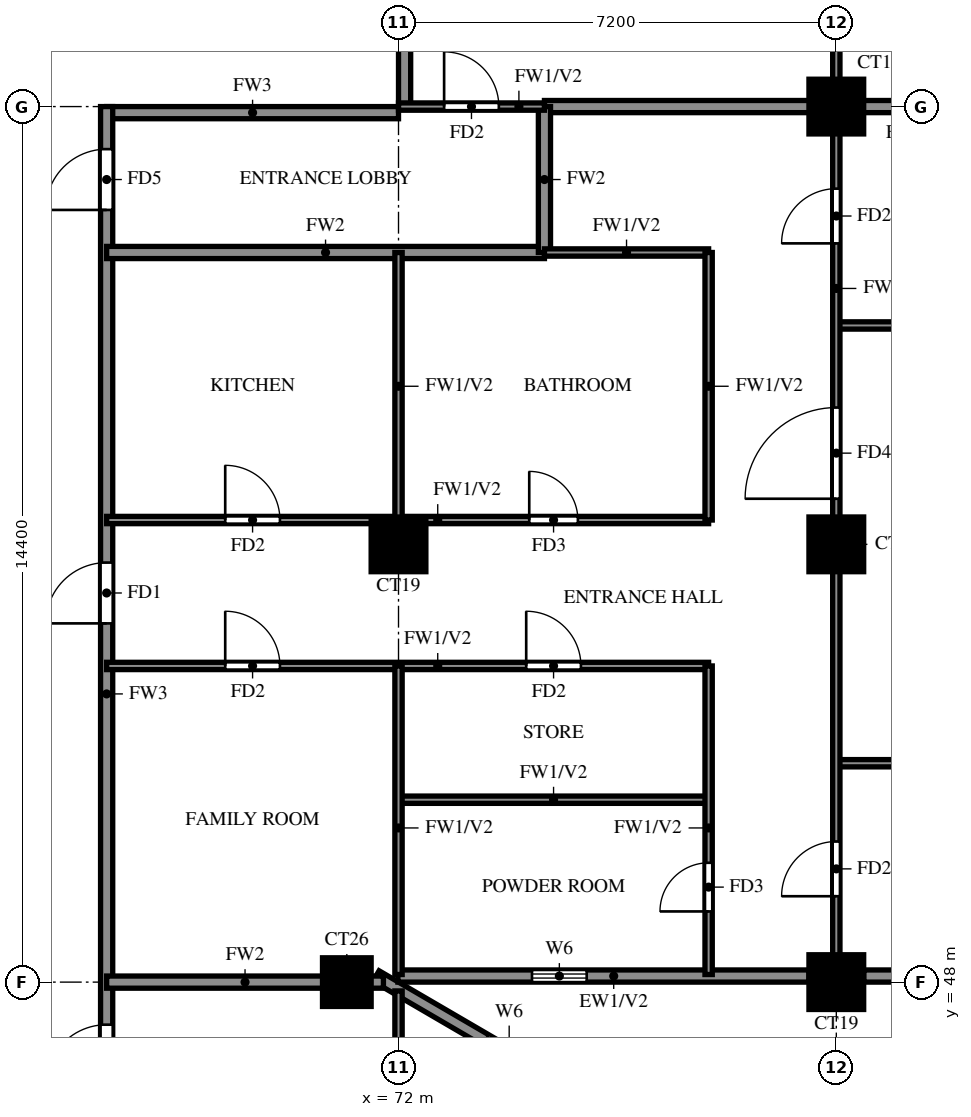
"""IFC4 building model, lengths in metres.
Left out: names, types, materials, properties, quantities, classifications, styles, units other than length and angle.
Written with IfcOpenShell. Run it as: python <this file> out.ifc"""

import sys

from ifc_helpers import new_model, si_unit, direction, frame, frame_2d, origin, origin_2d, place, context, subcontext, project, spatial, rectangle, extrude, source, transform, mapped, element, fill, save


model = new_model("IFC4")
c1 = context("Model", 3, precision=1e-05, world=origin(), true_north=direction((0.0, 1.0)))
c2 = subcontext(c1, "Body", "Model", "MODEL_VIEW")
j1 = project(units=[si_unit("LENGTHUNIT", "METRE"), si_unit("PLANEANGLEUNIT", "RADIAN")], contexts=[c1])
p1 = place(None, origin())
s1 = spatial("IfcSite", under=j1, at=p1, CompositionType="ELEMENT")
p2 = place(p1, origin())
s2 = spatial("IfcBuilding", under=s1, at=p2, CompositionType="ELEMENT")
p3 = place(p2, frame((0.0, 0.0, 185.0)))
s3 = spatial("IfcBuildingStorey", under=s2, at=p3, CompositionType="ELEMENT", Elevation=185.0)
m1 = source(origin(), c2, "Body", "SweptSolid", [
    extrude(rectangle(XDim=0.8, YDim=0.8, at=origin_2d()), origin(), (0.0, 0.0, 1.0), 3.2),
])
p4 = place(p3, frame((71.15, 48.0, 0.0), z_axis=(0.0, 0.0, 1.0), x_axis=(1.0, 0.0, 0.0)))
e1 = element("IfcColumn", 1, at=p4, inside=s3, PredefinedType="COLUMN", context=c2, shape_type="MappedRepresentation", body=[
    mapped(m1, transform((0.0, 0.0, 0.0))),
])
m2 = source(origin(), c2, "Body", "SweptSolid", [
    extrude(rectangle(XDim=0.9, YDim=0.9, at=origin_2d()), origin(), (0.0, 0.0, 1.0), 3.2),
])
for number, where, z_axis, x_axis in (
    (2, (79.2, 48.0, 0.0), (0.0, 0.0, 1.0), (1.0, 0.0, 0.0)),
    (3, (72.0, 55.2, 0.0), (0.0, 0.0, 1.0), (1.0, 0.0, 0.0)),
    (4, (79.2, 55.2, 0.0), (0.0, 0.0, 1.0), (1.0, 0.0, 0.0)),
    (5, (79.2, 62.4, 0.0), (0.0, 0.0, 1.0), (1.0, 0.0, 0.0)),
):
    element("IfcColumn", number, at=place(p3, frame(where, z_axis=z_axis, x_axis=x_axis)), inside=s3, PredefinedType="COLUMN", context=c2, shape_type="MappedRepresentation", body=[
        mapped(m2, transform((0.0, 0.0, 0.0))),
    ])
p5 = place(p3, frame((85.719, 39.881, 0.0), z_axis=(0.0, 0.0, 1.0), x_axis=(-0.86377618652, 0.503875678716, 0.0)))
e6 = element("IfcWall", 6, at=p5, inside=s3, PredefinedType="SOLIDWALL", context=c2, shape_type="SweptSolid", body=[
    extrude(rectangle(XDim=16.311, YDim=0.2, at=frame_2d((8.156, 0.0))), origin(), (0.0, 0.0, 1.0), 3.2),
])
p6 = place(p5, frame((13.326, 0.0, 1.5)))
e7 = element("IfcOpeningElement", 7, at=p6, cuts=e6, PredefinedType="OPENING", context=c2, shape_type="SweptSolid", body=[
    extrude(rectangle(XDim=0.9, YDim=0.9, at=frame_2d((0.45, 0.45))), frame((0.0, 0.11, 0.0), z_axis=(0.0, -1.0, 0.0), x_axis=(1.0, 0.0, 0.0)), (0.0, 0.0, 1.0), 0.22),
])
p7 = place(p3, frame((71.99, 48.1, 0.0), z_axis=(0.0, 0.0, 1.0), x_axis=(1.0, 0.0, 0.0)))
e8 = element("IfcWall", 8, at=p7, inside=s3, PredefinedType="SOLIDWALL", context=c2, shape_type="SweptSolid", body=[
    extrude(rectangle(XDim=6.76, YDim=0.2, at=frame_2d((3.38, 0.0))), origin(), (0.0, 0.0, 1.0), 3.2),
])
p8 = place(p7, frame((2.205, 0.0, 1.5)))
e9 = element("IfcOpeningElement", 9, at=p8, cuts=e8, PredefinedType="OPENING", context=c2, shape_type="SweptSolid", body=[
    extrude(rectangle(XDim=0.9, YDim=0.9, at=frame_2d((0.45, 0.45))), frame((0.0, 0.11, 0.0), z_axis=(0.0, -1.0, 0.0), x_axis=(1.0, 0.0, 0.0)), (0.0, 0.0, 1.0), 0.22),
])
p9 = place(p3, frame((79.65, 48.1, 0.0), z_axis=(0.0, 0.0, 1.0), x_axis=(1.0, 0.0, 0.0)))
e10 = element("IfcWall", 10, at=p9, inside=s3, PredefinedType="SOLIDWALL", context=c2, shape_type="SweptSolid", body=[
    extrude(rectangle(XDim=5.75, YDim=0.2, at=frame_2d((2.875, 0.0))), origin(), (0.0, 0.0, 1.0), 3.2),
])
p10 = place(p9, frame((1.675, 0.0, 0.6)))
e11 = element("IfcOpeningElement", 11, at=p10, cuts=e10, PredefinedType="OPENING", context=c2, shape_type="SweptSolid", body=[
    extrude(rectangle(XDim=2.4, YDim=2.4, at=frame_2d((1.2, 1.2))), frame((0.0, 0.11, 0.0), z_axis=(0.0, -1.0, 0.0), x_axis=(1.0, 0.0, 0.0)), (0.0, 0.0, 1.0), 0.22),
])
p11 = place(p3, frame((67.2, 62.3, 0.0), z_axis=(0.0, 0.0, 1.0), x_axis=(1.0, 0.0, 0.0)))
e12 = element("IfcWall", 12, at=p11, inside=s3, PredefinedType="SOLIDWALL", context=c2, shape_type="SweptSolid", body=[
    extrude(rectangle(XDim=4.8, YDim=0.2, at=frame_2d((2.4, 0.0))), origin(), (0.0, 0.0, 1.0), 3.2),
])
p12 = place(p3, frame((67.2, 45.6, 0.0), z_axis=(0.0, 0.0, 1.0), x_axis=(0.0, 1.0, 0.0)))
e13 = element("IfcWall", 13, at=p12, inside=s3, PredefinedType="SOLIDWALL", context=c2, shape_type="SweptSolid", body=[
    extrude(rectangle(XDim=16.8, YDim=0.2, at=frame_2d((8.4, 0.0))), origin(), (0.0, 0.0, 1.0), 3.2),
])
p13 = place(p12, frame((8.3, 0.0, 0.0)))
e14 = element("IfcOpeningElement", 14, at=p13, cuts=e13, PredefinedType="OPENING", context=c2, shape_type="SweptSolid", body=[
    extrude(rectangle(XDim=1.0, YDim=2.1, at=frame_2d((0.5, 1.05))), frame((0.0, 0.11, 0.0), z_axis=(0.0, -1.0, 0.0), x_axis=(1.0, 0.0, 0.0)), (0.0, 0.0, 1.0), 0.22),
])
p14 = place(p12, frame((15.1, 0.0, 0.0)))
e15 = element("IfcOpeningElement", 15, at=p14, cuts=e13, PredefinedType="OPENING", context=c2, shape_type="SweptSolid", body=[
    extrude(rectangle(XDim=1.0, YDim=2.1, at=frame_2d((0.5, 1.05))), frame((0.0, 0.11, 0.0), z_axis=(0.0, -1.0, 0.0), x_axis=(1.0, 0.0, 0.0)), (0.0, 0.0, 1.0), 0.22),
])
p15 = place(p12, frame((0.7, 0.0, 0.0)))
e16 = element("IfcOpeningElement", 16, at=p15, cuts=e13, PredefinedType="OPENING", context=c2, shape_type="SweptSolid", body=[
    extrude(rectangle(XDim=1.0, YDim=2.1, at=frame_2d((0.5, 1.05))), frame((0.0, 0.11, 0.0), z_axis=(0.0, -1.0, 0.0), x_axis=(1.0, 0.0, 0.0)), (0.0, 0.0, 1.0), 0.22),
])
p16 = place(p3, frame((72.1, 62.4, 0.0), z_axis=(0.0, 0.0, 1.0), x_axis=(0.0, 1.0, 0.0)))
e17 = element("IfcWall", 17, at=p16, inside=s3, PredefinedType="SOLIDWALL", context=c2, shape_type="SweptSolid", body=[
    extrude(rectangle(XDim=15.6, YDim=0.2, at=frame_2d((7.8, 0.0))), origin(), (0.0, 0.0, 1.0), 3.2),
])
p17 = place(p3, frame((67.2, 48.0, 0.0), z_axis=(0.0, 0.0, 1.0), x_axis=(1.0, 0.0, 0.0)))
e18 = element("IfcWall", 18, at=p17, inside=s3, PredefinedType="SOLIDWALL", context=c2, shape_type="SweptSolid", body=[
    extrude(rectangle(XDim=4.552, YDim=0.2, at=frame_2d((2.276, 0.0))), origin(), (0.0, 0.0, 1.0), 3.2),
])
p18 = place(p3, frame((67.2, 60.0, 0.0), z_axis=(0.0, 0.0, 1.0), x_axis=(1.0, 0.0, 0.0)))
e19 = element("IfcWall", 19, at=p18, inside=s3, PredefinedType="SOLIDWALL", context=c2, shape_type="SweptSolid", body=[
    extrude(rectangle(XDim=7.2, YDim=0.2, at=frame_2d((3.6, 0.0))), origin(), (0.0, 0.0, 1.0), 3.2),
])
p19 = place(p3, frame((74.4, 62.4, 0.0), z_axis=(0.0, 0.0, 1.0), x_axis=(1.0, 0.0, 0.0)))
e20 = element("IfcWall", 20, at=p19, inside=s3, PredefinedType="SOLIDWALL", context=c2, shape_type="SweptSolid", body=[
    extrude(rectangle(XDim=11.875, YDim=0.2, at=frame_2d((5.938, 0.0))), origin(), (0.0, 0.0, 1.0), 3.2),
])
p20 = place(p3, frame((74.4, 60.0, 0.0), z_axis=(0.0, 0.0, 1.0), x_axis=(0.0, 1.0, 0.0)))
e21 = element("IfcWall", 21, at=p20, inside=s3, PredefinedType="SOLIDWALL", context=c2, shape_type="SweptSolid", body=[
    extrude(rectangle(XDim=2.4, YDim=0.2, at=frame_2d((1.2, 0.0))), origin(), (0.0, 0.0, 1.0), 3.2),
])
p21 = place(p3, frame((72.0, 51.0, 0.0), z_axis=(0.0, 0.0, 1.0), x_axis=(1.0, 0.0, 0.0)))
e22 = element("IfcWall", 22, at=p21, inside=s3, PredefinedType="PARTITIONING", context=c2, shape_type="SweptSolid", body=[
    extrude(rectangle(XDim=5.1, YDim=0.12, at=frame_2d((2.55, 0.0))), origin(), (0.0, 0.0, 1.0), 3.2),
])
p22 = place(p3, frame((79.2, 51.6, 0.0), z_axis=(0.0, 0.0, 1.0), x_axis=(1.0, 0.0, 0.0)))
e23 = element("IfcWall", 23, at=p22, inside=s3, PredefinedType="PARTITIONING", context=c2, shape_type="SweptSolid", body=[
    extrude(rectangle(XDim=7.075, YDim=0.12, at=frame_2d((3.538, 0.0))), origin(), (0.0, 0.0, 1.0), 2.3),
])
p23 = place(p3, frame((67.2, 53.2, 0.0), z_axis=(0.0, 0.0, 1.0), x_axis=(1.0, 0.0, 0.0)))
e24 = element("IfcWall", 24, at=p23, inside=s3, PredefinedType="PARTITIONING", context=c2, shape_type="SweptSolid", body=[
    extrude(rectangle(XDim=9.9, YDim=0.12, at=frame_2d((4.95, 0.0))), origin(), (0.0, 0.0, 1.0), 3.2),
])
p24 = place(p23, frame((6.9, 0.0, 0.0)))
e25 = element("IfcOpeningElement", 25, at=p24, cuts=e24, PredefinedType="OPENING", context=c2, shape_type="SweptSolid", body=[
    extrude(rectangle(XDim=0.9, YDim=2.1, at=frame_2d((0.45, 1.05))), frame((0.0, 0.07, 0.0), z_axis=(0.0, -1.0, 0.0), x_axis=(1.0, 0.0, 0.0)), (0.0, 0.0, 1.0), 0.14),
])
p25 = place(p23, frame((1.95, 0.0, 0.0)))
e26 = element("IfcOpeningElement", 26, at=p25, cuts=e24, PredefinedType="OPENING", context=c2, shape_type="SweptSolid", body=[
    extrude(rectangle(XDim=0.9, YDim=2.1, at=frame_2d((0.45, 1.05))), frame((0.0, 0.07, 0.0), z_axis=(0.0, -1.0, 0.0), x_axis=(1.0, 0.0, 0.0)), (0.0, 0.0, 1.0), 0.14),
])
p26 = place(p3, frame((67.2, 55.6, 0.0), z_axis=(0.0, 0.0, 1.0), x_axis=(1.0, 0.0, 0.0)))
e27 = element("IfcWall", 27, at=p26, inside=s3, PredefinedType="PARTITIONING", context=c2, shape_type="SweptSolid", body=[
    extrude(rectangle(XDim=9.9, YDim=0.12, at=frame_2d((4.95, 0.0))), origin(), (0.0, 0.0, 1.0), 3.2),
])
p27 = place(p26, frame((6.95, 0.0, 0.0)))
e28 = element("IfcOpeningElement", 28, at=p27, cuts=e27, PredefinedType="OPENING", context=c2, shape_type="SweptSolid", body=[
    extrude(rectangle(XDim=0.8, YDim=2.1, at=frame_2d((0.4, 1.05))), frame((0.0, 0.07, 0.0), z_axis=(0.0, -1.0, 0.0), x_axis=(1.0, 0.0, 0.0)), (0.0, 0.0, 1.0), 0.14),
])
p28 = place(p26, frame((1.95, 0.0, 0.0)))
e29 = element("IfcOpeningElement", 29, at=p28, cuts=e27, PredefinedType="OPENING", context=c2, shape_type="SweptSolid", body=[
    extrude(rectangle(XDim=0.9, YDim=2.1, at=frame_2d((0.45, 1.05))), frame((0.0, 0.07, 0.0), z_axis=(0.0, -1.0, 0.0), x_axis=(1.0, 0.0, 0.0)), (0.0, 0.0, 1.0), 0.14),
])
p29 = place(p3, frame((79.2, 58.8, 0.0), z_axis=(0.0, 0.0, 1.0), x_axis=(1.0, 0.0, 0.0)))
e30 = element("IfcWall", 30, at=p29, inside=s3, PredefinedType="PARTITIONING", context=c2, shape_type="SweptSolid", body=[
    extrude(rectangle(XDim=7.075, YDim=0.12, at=frame_2d((3.538, 0.0))), origin(), (0.0, 0.0, 1.0), 2.3),
])
p30 = place(p3, frame((74.4, 60.0, 0.0), z_axis=(0.0, 0.0, 1.0), x_axis=(1.0, 0.0, 0.0)))
e31 = element("IfcWall", 31, at=p30, inside=s3, PredefinedType="PARTITIONING", context=c2, shape_type="SweptSolid", body=[
    extrude(rectangle(XDim=2.7, YDim=0.12, at=frame_2d((1.35, 0.0))), origin(), (0.0, 0.0, 1.0), 3.2),
])
p31 = place(p3, frame((72.0, 62.4, 0.0), z_axis=(0.0, 0.0, 1.0), x_axis=(1.0, 0.0, 0.0)))
e32 = element("IfcWall", 32, at=p31, inside=s3, PredefinedType="PARTITIONING", context=c2, shape_type="SweptSolid", body=[
    extrude(rectangle(XDim=2.4, YDim=0.12, at=frame_2d((1.2, 0.0))), origin(), (0.0, 0.0, 1.0), 3.2),
])
p32 = place(p31, frame((0.75, 0.0, 0.0)))
e33 = element("IfcOpeningElement", 33, at=p32, cuts=e32, PredefinedType="OPENING", context=c2, shape_type="SweptSolid", body=[
    extrude(rectangle(XDim=0.9, YDim=2.1, at=frame_2d((0.45, 1.05))), frame((0.0, 0.07, 0.0), z_axis=(0.0, -1.0, 0.0), x_axis=(1.0, 0.0, 0.0)), (0.0, 0.0, 1.0), 0.14),
])
p33 = place(p3, frame((72.0, 39.725, 0.0), z_axis=(0.0, 0.0, 1.0), x_axis=(0.0, 1.0, 0.0)))
e34 = element("IfcWall", 34, at=p33, inside=s3, PredefinedType="PARTITIONING", context=c2, shape_type="SweptSolid", body=[
    extrude(rectangle(XDim=8.13, YDim=0.12, at=frame_2d((4.065, 0.0))), origin(), (0.0, 0.0, 1.0), 2.3),
])
p34 = place(p33, frame((1.788, 0.0, 0.0)))
e35 = element("IfcOpeningElement", 35, at=p34, cuts=e34, PredefinedType="OPENING", context=c2, shape_type="SweptSolid", body=[
    extrude(rectangle(XDim=1.5, YDim=2.1, at=frame_2d((0.75, 1.05))), frame((0.0, 0.07, 0.0), z_axis=(0.0, -1.0, 0.0), x_axis=(1.0, 0.0, 0.0)), (0.0, 0.0, 1.0), 0.14),
])
p35 = place(p33, frame((4.575, 0.0, 0.0)))
e36 = element("IfcOpeningElement", 36, at=p35, cuts=e34, PredefinedType="OPENING", context=c2, shape_type="SweptSolid", body=[
    extrude(rectangle(XDim=0.8, YDim=2.1, at=frame_2d((0.4, 1.05))), frame((0.0, 0.07, 0.0), z_axis=(0.0, -1.0, 0.0), x_axis=(1.0, 0.0, 0.0)), (0.0, 0.0, 1.0), 0.14),
])
p36 = place(p3, frame((72.0, 48.125, 0.0), z_axis=(0.0, 0.0, 1.0), x_axis=(0.0, 1.0, 0.0)))
e37 = element("IfcWall", 37, at=p36, inside=s3, PredefinedType="PARTITIONING", context=c2, shape_type="SweptSolid", body=[
    extrude(rectangle(XDim=5.075, YDim=0.12, at=frame_2d((2.538, 0.0))), origin(), (0.0, 0.0, 1.0), 3.2),
])
p37 = place(p3, frame((72.0, 55.6, 0.0), z_axis=(0.0, 0.0, 1.0), x_axis=(0.0, 1.0, 0.0)))
e38 = element("IfcWall", 38, at=p37, inside=s3, PredefinedType="PARTITIONING", context=c2, shape_type="SweptSolid", body=[
    extrude(rectangle(XDim=4.4, YDim=0.12, at=frame_2d((2.2, 0.0))), origin(), (0.0, 0.0, 1.0), 3.2),
])
p38 = place(p3, frame((77.1, 48.125, 0.0), z_axis=(0.0, 0.0, 1.0), x_axis=(0.0, 1.0, 0.0)))
e39 = element("IfcWall", 39, at=p38, inside=s3, PredefinedType="PARTITIONING", context=c2, shape_type="SweptSolid", body=[
    extrude(rectangle(XDim=5.075, YDim=0.12, at=frame_2d((2.538, 0.0))), origin(), (0.0, 0.0, 1.0), 3.2),
])
p39 = place(p38, frame((1.038, 0.0, 0.0)))
e40 = element("IfcOpeningElement", 40, at=p39, cuts=e39, PredefinedType="OPENING", context=c2, shape_type="SweptSolid", body=[
    extrude(rectangle(XDim=0.8, YDim=2.1, at=frame_2d((0.4, 1.05))), frame((0.0, 0.07, 0.0), z_axis=(0.0, -1.0, 0.0), x_axis=(1.0, 0.0, 0.0)), (0.0, 0.0, 1.0), 0.14),
])
p40 = place(p3, frame((77.1, 55.6, 0.0), z_axis=(0.0, 0.0, 1.0), x_axis=(0.0, 1.0, 0.0)))
e41 = element("IfcWall", 41, at=p40, inside=s3, PredefinedType="PARTITIONING", context=c2, shape_type="SweptSolid", body=[
    extrude(rectangle(XDim=4.4, YDim=0.12, at=frame_2d((2.2, 0.0))), origin(), (0.0, 0.0, 1.0), 3.2),
])
p41 = place(p3, frame((79.2, 48.125, 0.0), z_axis=(0.0, 0.0, 1.0), x_axis=(0.0, 1.0, 0.0)))
e42 = element("IfcWall", 42, at=p41, inside=s3, PredefinedType="PARTITIONING", context=c2, shape_type="SweptSolid", body=[
    extrude(rectangle(XDim=25.075, YDim=0.12, at=frame_2d((12.538, 0.0))), origin(), (0.0, 0.0, 1.0), 3.2),
])
p42 = place(p41, frame((1.288, 0.0, 0.0)))
e43 = element("IfcOpeningElement", 43, at=p42, cuts=e42, PredefinedType="OPENING", context=c2, shape_type="SweptSolid", body=[
    extrude(rectangle(XDim=0.9, YDim=2.1, at=frame_2d((0.45, 1.05))), frame((0.0, 0.07, 0.0), z_axis=(0.0, -1.0, 0.0), x_axis=(1.0, 0.0, 0.0)), (0.0, 0.0, 1.0), 0.14),
])
p43 = place(p41, frame((7.825, 0.0, 0.0)))
e44 = element("IfcOpeningElement", 44, at=p43, cuts=e42, PredefinedType="OPENING", context=c2, shape_type="SweptSolid", body=[
    extrude(rectangle(XDim=1.5, YDim=2.1, at=frame_2d((0.75, 1.05))), frame((0.0, 0.07, 0.0), z_axis=(0.0, -1.0, 0.0), x_axis=(1.0, 0.0, 0.0)), (0.0, 0.0, 1.0), 0.14),
])
p44 = place(p41, frame((12.025, 0.0, 0.0)))
e45 = element("IfcOpeningElement", 45, at=p44, cuts=e42, PredefinedType="OPENING", context=c2, shape_type="SweptSolid", body=[
    extrude(rectangle(XDim=0.9, YDim=2.1, at=frame_2d((0.45, 1.05))), frame((0.0, 0.07, 0.0), z_axis=(0.0, -1.0, 0.0), x_axis=(1.0, 0.0, 0.0)), (0.0, 0.0, 1.0), 0.14),
])
p45 = place(p41, frame((15.625, 0.0, 0.0)))
e46 = element("IfcOpeningElement", 46, at=p45, cuts=e42, PredefinedType="OPENING", context=c2, shape_type="SweptSolid", body=[
    extrude(rectangle(XDim=0.9, YDim=2.1, at=frame_2d((0.45, 1.05))), frame((0.0, 0.07, 0.0), z_axis=(0.0, -1.0, 0.0), x_axis=(1.0, 0.0, 0.0)), (0.0, 0.0, 1.0), 0.14),
])
p46 = place(p41, frame((19.225, 0.0, 0.0)))
e47 = element("IfcOpeningElement", 47, at=p46, cuts=e42, PredefinedType="OPENING", context=c2, shape_type="SweptSolid", body=[
    extrude(rectangle(XDim=0.9, YDim=2.1, at=frame_2d((0.45, 1.05))), frame((0.0, 0.07, 0.0), z_axis=(0.0, -1.0, 0.0), x_axis=(1.0, 0.0, 0.0)), (0.0, 0.0, 1.0), 0.14),
])
p47 = place(p41, frame((22.825, 0.0, 0.0)))
e48 = element("IfcOpeningElement", 48, at=p47, cuts=e42, PredefinedType="OPENING", context=c2, shape_type="SweptSolid", body=[
    extrude(rectangle(XDim=0.9, YDim=2.1, at=frame_2d((0.45, 1.05))), frame((0.0, 0.07, 0.0), z_axis=(0.0, -1.0, 0.0), x_axis=(1.0, 0.0, 0.0)), (0.0, 0.0, 1.0), 0.14),
])
p48 = place(p8, origin())
e49 = element("IfcWindow", 49, at=p48, inside=s3, PartitioningType="SINGLE_PANEL", PredefinedType="WINDOW", context=c2, shape_type="SweptSolid", body=[
    extrude(rectangle(XDim=0.9, YDim=0.9, at=frame_2d((0.45, 0.45))), frame((0.0, 0.03, 0.0), z_axis=(0.0, -1.0, 0.0), x_axis=(1.0, 0.0, 0.0)), (0.0, 0.0, 1.0), 0.06),
])
fill(e9, e49)
p49 = place(p13, origin())
e50 = element("IfcDoor", 50, at=p49, inside=s3, OperationType="SINGLE_SWING_RIGHT", PredefinedType="DOOR", context=c2, shape_type="SweptSolid", body=[
    extrude(rectangle(XDim=1.0, YDim=2.1, at=frame_2d((0.5, 1.05))), frame((0.0, 0.025, 0.0), z_axis=(0.0, -1.0, 0.0), x_axis=(1.0, 0.0, 0.0)), (0.0, 0.0, 1.0), 0.05),
])
fill(e14, e50)
p50 = place(p42, origin())
e51 = element("IfcDoor", 51, at=p50, inside=s3, OperationType="SINGLE_SWING_LEFT", PredefinedType="DOOR", context=c2, shape_type="SweptSolid", body=[
    extrude(rectangle(XDim=0.9, YDim=2.1, at=frame_2d((0.45, 1.05))), frame((0.0, 0.025, 0.0), z_axis=(0.0, -1.0, 0.0), x_axis=(1.0, 0.0, 0.0)), (0.0, 0.0, 1.0), 0.05),
])
fill(e43, e51)
p51 = place(p43, origin())
e52 = element("IfcDoor", 52, at=p51, inside=s3, OperationType="SINGLE_SWING_RIGHT", PredefinedType="DOOR", context=c2, shape_type="SweptSolid", body=[
    extrude(rectangle(XDim=1.5, YDim=2.1, at=frame_2d((0.75, 1.05))), frame((0.0, 0.025, 0.0), z_axis=(0.0, -1.0, 0.0), x_axis=(1.0, 0.0, 0.0)), (0.0, 0.0, 1.0), 0.05),
])
fill(e44, e52)
p52 = place(p44, origin())
e53 = element("IfcDoor", 53, at=p52, inside=s3, OperationType="SINGLE_SWING_RIGHT", PredefinedType="DOOR", context=c2, shape_type="SweptSolid", body=[
    extrude(rectangle(XDim=0.9, YDim=2.1, at=frame_2d((0.45, 1.05))), frame((0.0, 0.025, 0.0), z_axis=(0.0, -1.0, 0.0), x_axis=(1.0, 0.0, 0.0)), (0.0, 0.0, 1.0), 0.05),
])
fill(e45, e53)
p53 = place(p39, origin())
e54 = element("IfcDoor", 54, at=p53, inside=s3, OperationType="SINGLE_SWING_LEFT", PredefinedType="DOOR", context=c2, shape_type="SweptSolid", body=[
    extrude(rectangle(XDim=0.8, YDim=2.1, at=frame_2d((0.4, 1.05))), frame((0.0, 0.025, 0.0), z_axis=(0.0, -1.0, 0.0), x_axis=(1.0, 0.0, 0.0)), (0.0, 0.0, 1.0), 0.05),
])
fill(e40, e54)
p54 = place(p24, origin())
e55 = element("IfcDoor", 55, at=p54, inside=s3, OperationType="SINGLE_SWING_LEFT", PredefinedType="DOOR", context=c2, shape_type="SweptSolid", body=[
    extrude(rectangle(XDim=0.9, YDim=2.1, at=frame_2d((0.45, 1.05))), frame((0.0, 0.025, 0.0), z_axis=(0.0, -1.0, 0.0), x_axis=(1.0, 0.0, 0.0)), (0.0, 0.0, 1.0), 0.05),
])
fill(e25, e55)
p55 = place(p27, origin())
e56 = element("IfcDoor", 56, at=p55, inside=s3, OperationType="SINGLE_SWING_RIGHT", PredefinedType="DOOR", context=c2, shape_type="SweptSolid", body=[
    extrude(rectangle(XDim=0.8, YDim=2.1, at=frame_2d((0.4, 1.05))), frame((0.0, 0.025, 0.0), z_axis=(0.0, -1.0, 0.0), x_axis=(1.0, 0.0, 0.0)), (0.0, 0.0, 1.0), 0.05),
])
fill(e28, e56)
p56 = place(p25, origin())
e57 = element("IfcDoor", 57, at=p56, inside=s3, OperationType="SINGLE_SWING_LEFT", PredefinedType="DOOR", context=c2, shape_type="SweptSolid", body=[
    extrude(rectangle(XDim=0.9, YDim=2.1, at=frame_2d((0.45, 1.05))), frame((0.0, 0.025, 0.0), z_axis=(0.0, -1.0, 0.0), x_axis=(1.0, 0.0, 0.0)), (0.0, 0.0, 1.0), 0.05),
])
fill(e26, e57)
p57 = place(p28, origin())
e58 = element("IfcDoor", 58, at=p57, inside=s3, OperationType="SINGLE_SWING_LEFT", PredefinedType="DOOR", context=c2, shape_type="SweptSolid", body=[
    extrude(rectangle(XDim=0.9, YDim=2.1, at=frame_2d((0.45, 1.05))), frame((0.0, 0.025, 0.0), z_axis=(0.0, -1.0, 0.0), x_axis=(1.0, 0.0, 0.0)), (0.0, 0.0, 1.0), 0.05),
])
fill(e29, e58)
p58 = place(p32, origin())
e59 = element("IfcDoor", 59, at=p58, inside=s3, OperationType="SINGLE_SWING_LEFT", PredefinedType="DOOR", context=c2, shape_type="SweptSolid", body=[
    extrude(rectangle(XDim=0.9, YDim=2.1, at=frame_2d((0.45, 1.05))), frame((0.0, 0.025, 0.0), z_axis=(0.0, -1.0, 0.0), x_axis=(1.0, 0.0, 0.0)), (0.0, 0.0, 1.0), 0.05),
])
fill(e33, e59)
p59 = place(p14, origin())
e60 = element("IfcDoor", 60, at=p59, inside=s3, OperationType="SINGLE_SWING_LEFT", PredefinedType="DOOR", context=c2, shape_type="SweptSolid", body=[
    extrude(rectangle(XDim=1.0, YDim=2.1, at=frame_2d((0.5, 1.05))), frame((0.0, 0.025, 0.0), z_axis=(0.0, -1.0, 0.0), x_axis=(1.0, 0.0, 0.0)), (0.0, 0.0, 1.0), 0.05),
])
fill(e15, e60)
p60 = place(p15, origin())
e61 = element("IfcDoor", 61, at=p60, inside=s3, OperationType="SINGLE_SWING_LEFT", PredefinedType="DOOR", context=c2, shape_type="SweptSolid", body=[
    extrude(rectangle(XDim=1.0, YDim=2.1, at=frame_2d((0.5, 1.05))), frame((0.0, 0.025, 0.0), z_axis=(0.0, -1.0, 0.0), x_axis=(1.0, 0.0, 0.0)), (0.0, 0.0, 1.0), 0.05),
])
fill(e16, e61)
save(model, sys.argv[1])
